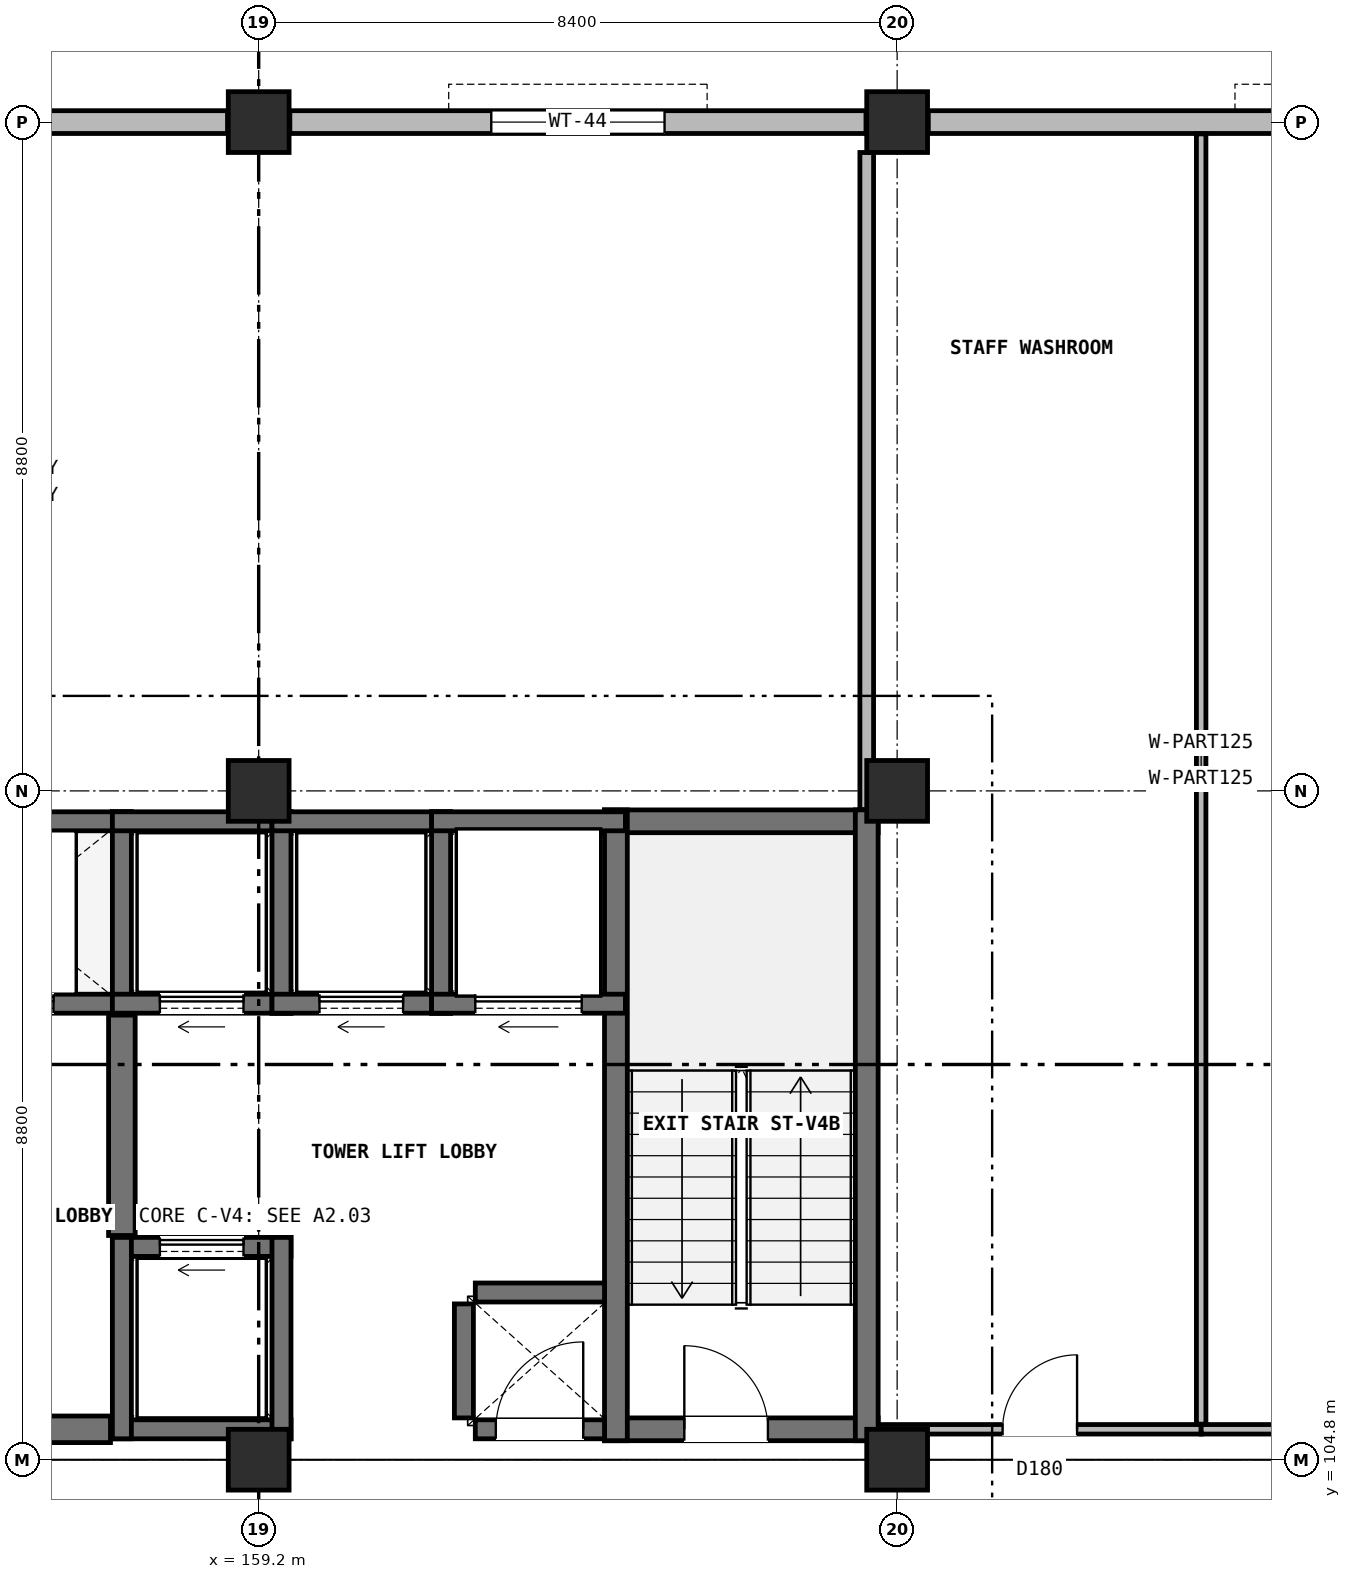
"""IFC4 building model, lengths in metres.
Left out: names, types, materials, properties, quantities, classifications, styles, units other than length and angle.
Written with IfcOpenShell. Run it as: python <this file> out.ifc"""

import sys

from ifc_helpers import new_model, si_unit, direction, frame, frame_2d, origin, origin_2d, place, context, subcontext, project, spatial, rectangle, extrude, element, fill, save


model = new_model("IFC4")
c1 = context("Model", 3, precision=1e-05, world=origin(), true_north=direction((0.0, 1.0)))
c2 = subcontext(c1, "Body", "Model", "MODEL_VIEW")
j1 = project(units=[si_unit("LENGTHUNIT", "METRE"), si_unit("PLANEANGLEUNIT", "RADIAN")], contexts=[c1])
p1 = place(None, origin())
s1 = spatial("IfcSite", under=j1, at=p1, CompositionType="ELEMENT")
p2 = place(p1, origin())
s2 = spatial("IfcBuilding", under=s1, at=p2, CompositionType="ELEMENT")
p3 = place(p2, frame((0.0, 0.0, 9.0)))
s3 = spatial("IfcBuildingStorey", under=s2, at=p3, CompositionType="ELEMENT", Elevation=9.0)
for number, where, z_axis, x_axis in (
    (1, (159.2, 104.8, 0.0), (0.0, 0.0, 1.0), (1.0, 0.0, 0.0)),
    (2, (159.2, 113.6, 0.0), (0.0, 0.0, 1.0), (1.0, 0.0, 0.0)),
    (3, (159.2, 122.4, 0.0), (0.0, 0.0, 1.0), (1.0, 0.0, 0.0)),
    (4, (167.6, 104.8, 0.0), (0.0, 0.0, 1.0), (1.0, 0.0, 0.0)),
    (5, (167.6, 113.6, 0.0), (0.0, 0.0, 1.0), (1.0, 0.0, 0.0)),
    (6, (167.6, 122.4, 0.0), (0.0, 0.0, 1.0), (1.0, 0.0, 0.0)),
):
    element("IfcColumn", number, at=place(p3, frame(where, z_axis=z_axis, x_axis=x_axis)), inside=s3, PredefinedType="COLUMN", context=c2, shape_type="SweptSolid", body=[
        extrude(rectangle(XDim=0.8, YDim=0.8, at=origin_2d()), origin(), (0.0, 0.0, 1.0), 4.2),
    ])
p4 = place(p3, frame((175.59, 122.4, 0.0), z_axis=(0.0, 0.0, 1.0), x_axis=(-1.0, 0.0, 0.0)))
e7 = element("IfcWall", 7, at=p4, inside=s3, PredefinedType="SOLIDWALL", context=c2, shape_type="SweptSolid", body=[
    extrude(rectangle(XDim=7.58, YDim=0.3, at=frame_2d((3.79, 0.0))), origin(), (0.0, 0.0, 1.0), 3.45),
])
p5 = place(p4, frame((1.005, 0.0, 0.9)))
e8 = element("IfcOpeningElement", 8, at=p5, cuts=e7, PredefinedType="OPENING", context=c2, shape_type="SweptSolid", body=[
    extrude(rectangle(XDim=1.98, YDim=2.32, at=frame_2d((0.99, 1.16))), frame((0.0, 0.16, 0.0), z_axis=(0.0, -1.0, 0.0), x_axis=(1.0, 0.0, 0.0)), (0.0, 0.0, 1.0), 0.32),
])
p6 = place(p3, frame((167.19, 122.4, 0.0), z_axis=(0.0, 0.0, 1.0), x_axis=(-1.0, 0.0, 0.0)))
e9 = element("IfcWall", 9, at=p6, inside=s3, PredefinedType="SOLIDWALL", context=c2, shape_type="SweptSolid", body=[
    extrude(rectangle(XDim=7.58, YDim=0.3, at=frame_2d((3.79, 0.0))), origin(), (0.0, 0.0, 1.0), 3.45),
])
p7 = place(p6, frame((2.65, 0.0, 0.9)))
e10 = element("IfcOpeningElement", 10, at=p7, cuts=e9, PredefinedType="OPENING", context=c2, shape_type="SweptSolid", body=[
    extrude(rectangle(XDim=2.28, YDim=2.36, at=frame_2d((1.14, 1.18))), frame((0.0, 0.16, 0.0), z_axis=(0.0, -1.0, 0.0), x_axis=(1.0, 0.0, 0.0)), (0.0, 0.0, 1.0), 0.32),
])
p8 = place(p3, frame((158.79, 122.4, 0.0), z_axis=(0.0, 0.0, 1.0), x_axis=(-1.0, 0.0, 0.0)))
e11 = element("IfcWall", 11, at=p8, inside=s3, PredefinedType="SOLIDWALL", context=c2, shape_type="SweptSolid", body=[
    extrude(rectangle(XDim=7.58, YDim=0.3, at=frame_2d((3.79, 0.0))), origin(), (0.0, 0.0, 1.0), 3.45),
])
p9 = place(p8, frame((3.21, 0.0, 0.9)))
e12 = element("IfcOpeningElement", 12, at=p9, cuts=e11, PredefinedType="OPENING", context=c2, shape_type="SweptSolid", body=[
    extrude(rectangle(XDim=1.16, YDim=1.74, at=frame_2d((0.58, 0.87))), frame((0.0, 0.16, 0.0), z_axis=(0.0, -1.0, 0.0), x_axis=(1.0, 0.0, 0.0)), (0.0, 0.0, 1.0), 0.32),
])
p10 = place(p3, frame((163.75, 105.2, 0.0), z_axis=(0.0, 0.0, 1.0), x_axis=(1.0, 0.0, 0.0)))
e13 = element("IfcWall", 13, at=p10, inside=s3, PredefinedType="SHEAR", context=c2, shape_type="SweptSolid", body=[
    extrude(rectangle(XDim=3.6, YDim=0.3, at=frame_2d((1.8, 0.0))), origin(), (0.0, 0.0, 1.0), 4.2),
])
p11 = place(p10, frame((1.05, 0.0, 0.0)))
e14 = element("IfcOpeningElement", 14, at=p11, cuts=e13, PredefinedType="OPENING", context=c2, shape_type="SweptSolid", body=[
    extrude(rectangle(XDim=1.1, YDim=2.2, at=frame_2d((0.55, 1.1))), frame((0.0, 0.16, 0.0), z_axis=(0.0, -1.0, 0.0), x_axis=(1.0, 0.0, 0.0)), (0.0, 0.0, 1.0), 0.32),
])
p12 = place(p3, frame((163.75, 113.2, 0.0), z_axis=(0.0, 0.0, 1.0), x_axis=(1.0, 0.0, 0.0)))
e15 = element("IfcWall", 15, at=p12, inside=s3, PredefinedType="SHEAR", context=c2, shape_type="SweptSolid", body=[
    extrude(rectangle(XDim=3.6, YDim=0.3, at=frame_2d((1.8, 0.0))), origin(), (0.0, 0.0, 1.0), 4.2),
])
for number, where, z_axis, x_axis in (
    (16, (163.9, 105.05, 0.0), (0.0, 0.0, 1.0), (0.0, 1.0, 0.0)),
    (17, (167.2, 105.05, 0.0), (0.0, 0.0, 1.0), (0.0, 1.0, 0.0)),
):
    element("IfcWall", number, at=place(p3, frame(where, z_axis=z_axis, x_axis=x_axis)), inside=s3, PredefinedType="SHEAR", context=c2, shape_type="SweptSolid", body=[
        extrude(rectangle(XDim=8.3, YDim=0.3, at=frame_2d((4.15, 0.0))), origin(), (0.0, 0.0, 1.0), 4.2),
    ])
p13 = place(p3, frame((154.275, 110.8, 0.0), z_axis=(0.0, 0.0, 1.0), x_axis=(1.0, 0.0, 0.0)))
e18 = element("IfcWall", 18, at=p13, inside=s3, PredefinedType="SOLIDWALL", context=c2, shape_type="SweptSolid", body=[
    extrude(rectangle(XDim=3.25, YDim=0.25, at=frame_2d((1.625, 0.0))), origin(), (0.0, 0.0, 1.0), 3.88),
])
p14 = place(p13, frame((1.025, 0.0, 0.0)))
e19 = element("IfcOpeningElement", 19, at=p14, cuts=e18, PredefinedType="OPENING", context=c2, shape_type="SweptSolid", body=[
    extrude(rectangle(XDim=1.2, YDim=2.2, at=frame_2d((0.6, 1.1))), frame((0.0, 0.135, 0.0), z_axis=(0.0, -1.0, 0.0), x_axis=(1.0, 0.0, 0.0)), (0.0, 0.0, 1.0), 0.27),
])
p15 = place(p3, frame((154.275, 113.2, 0.0), z_axis=(0.0, 0.0, 1.0), x_axis=(1.0, 0.0, 0.0)))
e20 = element("IfcWall", 20, at=p15, inside=s3, PredefinedType="SOLIDWALL", context=c2, shape_type="SweptSolid", body=[
    extrude(rectangle(XDim=3.25, YDim=0.25, at=frame_2d((1.625, 0.0))), origin(), (0.0, 0.0, 1.0), 3.88),
])
p16 = place(p3, frame((157.4, 110.675, 0.0), z_axis=(0.0, 0.0, 1.0), x_axis=(0.0, 1.0, 0.0)))
e21 = element("IfcWall", 21, at=p16, inside=s3, PredefinedType="SOLIDWALL", context=c2, shape_type="SweptSolid", body=[
    extrude(rectangle(XDim=2.65, YDim=0.25, at=frame_2d((1.325, 0.0))), origin(), (0.0, 0.0, 1.0), 3.88),
])
p17 = place(p3, frame((157.275, 110.8, 0.0), z_axis=(0.0, 0.0, 1.0), x_axis=(1.0, 0.0, 0.0)))
e22 = element("IfcWall", 22, at=p17, inside=s3, PredefinedType="SOLIDWALL", context=c2, shape_type="SweptSolid", body=[
    extrude(rectangle(XDim=2.35, YDim=0.25, at=frame_2d((1.175, 0.0))), origin(), (0.0, 0.0, 1.0), 3.88),
])
p18 = place(p17, frame((0.625, 0.0, 0.0)))
e23 = element("IfcOpeningElement", 23, at=p18, cuts=e22, PredefinedType="OPENING", context=c2, shape_type="SweptSolid", body=[
    extrude(rectangle(XDim=1.1, YDim=2.2, at=frame_2d((0.55, 1.1))), frame((0.0, 0.135, 0.0), z_axis=(0.0, -1.0, 0.0), x_axis=(1.0, 0.0, 0.0)), (0.0, 0.0, 1.0), 0.27),
])
p19 = place(p3, frame((157.275, 113.2, 0.0), z_axis=(0.0, 0.0, 1.0), x_axis=(1.0, 0.0, 0.0)))
e24 = element("IfcWall", 24, at=p19, inside=s3, PredefinedType="SOLIDWALL", context=c2, shape_type="SweptSolid", body=[
    extrude(rectangle(XDim=2.35, YDim=0.25, at=frame_2d((1.175, 0.0))), origin(), (0.0, 0.0, 1.0), 3.88),
])
p20 = place(p3, frame((159.5, 110.675, 0.0), z_axis=(0.0, 0.0, 1.0), x_axis=(0.0, 1.0, 0.0)))
e25 = element("IfcWall", 25, at=p20, inside=s3, PredefinedType="SOLIDWALL", context=c2, shape_type="SweptSolid", body=[
    extrude(rectangle(XDim=2.65, YDim=0.25, at=frame_2d((1.325, 0.0))), origin(), (0.0, 0.0, 1.0), 3.88),
])
p21 = place(p3, frame((159.375, 110.8, 0.0), z_axis=(0.0, 0.0, 1.0), x_axis=(1.0, 0.0, 0.0)))
e26 = element("IfcWall", 26, at=p21, inside=s3, PredefinedType="SOLIDWALL", context=c2, shape_type="SweptSolid", body=[
    extrude(rectangle(XDim=2.35, YDim=0.25, at=frame_2d((1.175, 0.0))), origin(), (0.0, 0.0, 1.0), 3.88),
])
p22 = place(p21, frame((0.625, 0.0, 0.0)))
e27 = element("IfcOpeningElement", 27, at=p22, cuts=e26, PredefinedType="OPENING", context=c2, shape_type="SweptSolid", body=[
    extrude(rectangle(XDim=1.1, YDim=2.2, at=frame_2d((0.55, 1.1))), frame((0.0, 0.135, 0.0), z_axis=(0.0, -1.0, 0.0), x_axis=(1.0, 0.0, 0.0)), (0.0, 0.0, 1.0), 0.27),
])
p23 = place(p3, frame((159.375, 113.2, 0.0), z_axis=(0.0, 0.0, 1.0), x_axis=(1.0, 0.0, 0.0)))
e28 = element("IfcWall", 28, at=p23, inside=s3, PredefinedType="SOLIDWALL", context=c2, shape_type="SweptSolid", body=[
    extrude(rectangle(XDim=2.35, YDim=0.25, at=frame_2d((1.175, 0.0))), origin(), (0.0, 0.0, 1.0), 3.88),
])
p24 = place(p3, frame((161.6, 110.675, 0.0), z_axis=(0.0, 0.0, 1.0), x_axis=(0.0, 1.0, 0.0)))
e29 = element("IfcWall", 29, at=p24, inside=s3, PredefinedType="SOLIDWALL", context=c2, shape_type="SweptSolid", body=[
    extrude(rectangle(XDim=2.65, YDim=0.25, at=frame_2d((1.325, 0.0))), origin(), (0.0, 0.0, 1.0), 3.88),
])
p25 = place(p3, frame((157.275, 105.2, 0.0), z_axis=(0.0, 0.0, 1.0), x_axis=(1.0, 0.0, 0.0)))
e30 = element("IfcWall", 30, at=p25, inside=s3, PredefinedType="SOLIDWALL", context=c2, shape_type="SweptSolid", body=[
    extrude(rectangle(XDim=2.35, YDim=0.25, at=frame_2d((1.175, 0.0))), origin(), (0.0, 0.0, 1.0), 3.88),
])
p26 = place(p3, frame((157.275, 107.6, 0.0), z_axis=(0.0, 0.0, 1.0), x_axis=(1.0, 0.0, 0.0)))
e31 = element("IfcWall", 31, at=p26, inside=s3, PredefinedType="SOLIDWALL", context=c2, shape_type="SweptSolid", body=[
    extrude(rectangle(XDim=2.35, YDim=0.25, at=frame_2d((1.175, 0.0))), origin(), (0.0, 0.0, 1.0), 3.88),
])
p27 = place(p26, frame((0.625, 0.0, 0.0)))
e32 = element("IfcOpeningElement", 32, at=p27, cuts=e31, PredefinedType="OPENING", context=c2, shape_type="SweptSolid", body=[
    extrude(rectangle(XDim=1.1, YDim=2.2, at=frame_2d((0.55, 1.1))), frame((0.0, 0.135, 0.0), z_axis=(0.0, -1.0, 0.0), x_axis=(1.0, 0.0, 0.0)), (0.0, 0.0, 1.0), 0.27),
])
for number, where, z_axis, x_axis in (
    (33, (157.4, 105.075, 0.0), (0.0, 0.0, 1.0), (0.0, 1.0, 0.0)),
    (34, (159.5, 105.075, 0.0), (0.0, 0.0, 1.0), (0.0, 1.0, 0.0)),
):
    element("IfcWall", number, at=place(p3, frame(where, z_axis=z_axis, x_axis=x_axis)), inside=s3, PredefinedType="SOLIDWALL", context=c2, shape_type="SweptSolid", body=[
        extrude(rectangle(XDim=2.65, YDim=0.25, at=frame_2d((1.325, 0.0))), origin(), (0.0, 0.0, 1.0), 3.88),
    ])
p28 = place(p3, frame((161.475, 110.8, 0.0), z_axis=(0.0, 0.0, 1.0), x_axis=(1.0, 0.0, 0.0)))
e35 = element("IfcWall", 35, at=p28, inside=s3, PredefinedType="SOLIDWALL", context=c2, shape_type="SweptSolid", body=[
    extrude(rectangle(XDim=2.55, YDim=0.25, at=frame_2d((1.275, 0.0))), origin(), (0.0, 0.0, 1.0), 3.88),
])
p29 = place(p28, frame((0.575, 0.0, 0.0)))
e36 = element("IfcOpeningElement", 36, at=p29, cuts=e35, PredefinedType="OPENING", context=c2, shape_type="SweptSolid", body=[
    extrude(rectangle(XDim=1.4, YDim=2.3, at=frame_2d((0.7, 1.15))), frame((0.0, 0.135, 0.0), z_axis=(0.0, -1.0, 0.0), x_axis=(1.0, 0.0, 0.0)), (0.0, 0.0, 1.0), 0.27),
])
p30 = place(p3, frame((161.475, 113.2, 0.0), z_axis=(0.0, 0.0, 1.0), x_axis=(1.0, 0.0, 0.0)))
e37 = element("IfcWall", 37, at=p30, inside=s3, PredefinedType="SOLIDWALL", context=c2, shape_type="SweptSolid", body=[
    extrude(rectangle(XDim=2.55, YDim=0.25, at=frame_2d((1.275, 0.0))), origin(), (0.0, 0.0, 1.0), 3.88),
])
p31 = place(p3, frame((157.4, 107.75, 0.0), z_axis=(0.0, 0.0, 1.0), x_axis=(0.0, 1.0, 0.0)))
e38 = element("IfcWall", 38, at=p31, inside=s3, PredefinedType="SHEAR", context=c2, shape_type="SweptSolid", body=[
    extrude(rectangle(XDim=2.9, YDim=0.35, at=frame_2d((1.45, 0.0))), origin(), (0.0, 0.0, 1.0), 3.88),
])
p32 = place(p3, frame((154.55, 105.2, 0.0), z_axis=(0.0, 0.0, 1.0), x_axis=(1.0, 0.0, 0.0)))
e39 = element("IfcWall", 39, at=p32, inside=s3, PredefinedType="SHEAR", context=c2, shape_type="SweptSolid", body=[
    extrude(rectangle(XDim=2.7, YDim=0.35, at=frame_2d((1.35, 0.0))), origin(), (0.0, 0.0, 1.0), 3.88),
])
p33 = place(p32, frame((0.8, 0.0, 0.0)))
e40 = element("IfcOpeningElement", 40, at=p33, cuts=e39, PredefinedType="OPENING", context=c2, shape_type="SweptSolid", body=[
    extrude(rectangle(XDim=1.1, YDim=2.2, at=frame_2d((0.55, 1.1))), frame((0.0, 0.185, 0.0), z_axis=(0.0, -1.0, 0.0), x_axis=(1.0, 0.0, 0.0)), (0.0, 0.0, 1.0), 0.37),
])
p34 = place(p3, frame((161.9, 105.35, 0.0), z_axis=(0.0, 0.0, 1.0), x_axis=(0.0, 1.0, 0.0)))
e41 = element("IfcWall", 41, at=p34, inside=s3, PredefinedType="SOLIDWALL", context=c2, shape_type="SweptSolid", body=[
    extrude(rectangle(XDim=1.5, YDim=0.25, at=frame_2d((0.75, 0.0))), origin(), (0.0, 0.0, 1.0), 3.88),
])
p35 = place(p3, frame((162.05, 107.0, 0.0), z_axis=(0.0, 0.0, 1.0), x_axis=(1.0, 0.0, 0.0)))
e42 = element("IfcWall", 42, at=p35, inside=s3, PredefinedType="SOLIDWALL", context=c2, shape_type="SweptSolid", body=[
    extrude(rectangle(XDim=1.7, YDim=0.25, at=frame_2d((0.85, 0.0))), origin(), (0.0, 0.0, 1.0), 3.88),
])
p36 = place(p3, frame((162.05, 105.2, 0.0), z_axis=(0.0, 0.0, 1.0), x_axis=(1.0, 0.0, 0.0)))
e43 = element("IfcWall", 43, at=p36, inside=s3, PredefinedType="SOLIDWALL", context=c2, shape_type="SweptSolid", body=[
    extrude(rectangle(XDim=1.7, YDim=0.25, at=frame_2d((0.85, 0.0))), origin(), (0.0, 0.0, 1.0), 3.88),
])
p37 = place(p36, frame((0.27, 0.0, 0.0)))
e44 = element("IfcOpeningElement", 44, at=p37, cuts=e43, PredefinedType="OPENING", context=c2, shape_type="SweptSolid", body=[
    extrude(rectangle(XDim=1.15, YDim=2.2, at=frame_2d((0.575, 1.1))), frame((0.0, 0.135, 0.0), z_axis=(0.0, -1.0, 0.0), x_axis=(1.0, 0.0, 0.0)), (0.0, 0.0, 1.0), 0.27),
])
p38 = place(p3, frame((167.355, 105.2, 0.0), z_axis=(0.0, 0.0, 1.0), x_axis=(1.0, 0.0, 0.0)))
e45 = element("IfcWall", 45, at=p38, inside=s3, PredefinedType="PARTITIONING", context=c2, shape_type="SweptSolid", body=[
    extrude(rectangle(XDim=4.245, YDim=0.125, at=frame_2d((2.123, 0.0))), origin(), (0.0, 0.0, 1.0), 3.245),
])
p39 = place(p38, frame((1.633, 0.0, 0.0)))
e46 = element("IfcOpeningElement", 46, at=p39, cuts=e45, PredefinedType="OPENING", context=c2, shape_type="SweptSolid", body=[
    extrude(rectangle(XDim=0.98, YDim=2.1, at=frame_2d((0.49, 1.05))), frame((0.0, 0.073, 0.0), z_axis=(0.0, -1.0, 0.0), x_axis=(1.0, 0.0, 0.0)), (0.0, 0.0, 1.0), 0.145),
])
p40 = place(p3, frame((171.6, 105.2, 0.0), z_axis=(0.0, 0.0, 1.0), x_axis=(1.0, 0.0, 0.0)))
e47 = element("IfcWall", 47, at=p40, inside=s3, PredefinedType="PARTITIONING", context=c2, shape_type="SweptSolid", body=[
    extrude(rectangle(XDim=4.0, YDim=0.125, at=frame_2d((2.0, 0.0))), origin(), (0.0, 0.0, 1.0), 3.245),
])
p41 = place(p40, frame((1.51, 0.0, 0.0)))
e48 = element("IfcOpeningElement", 48, at=p41, cuts=e47, PredefinedType="OPENING", context=c2, shape_type="SweptSolid", body=[
    extrude(rectangle(XDim=0.98, YDim=2.1, at=frame_2d((0.49, 1.05))), frame((0.0, 0.073, 0.0), z_axis=(0.0, -1.0, 0.0), x_axis=(1.0, 0.0, 0.0)), (0.0, 0.0, 1.0), 0.145),
])
p42 = place(p3, frame((167.2, 113.355, 0.0), z_axis=(0.0, 0.0, 1.0), x_axis=(0.0, 1.0, 0.0)))
e49 = element("IfcWall", 49, at=p42, inside=s3, PredefinedType="PARTITIONING", context=c2, shape_type="SweptSolid", body=[
    extrude(rectangle(XDim=8.645, YDim=0.18, at=frame_2d((4.323, 0.0))), origin(), (0.0, 0.0, 1.0), 3.245),
])
p43 = place(p3, frame((171.6, 105.268, 0.0), z_axis=(0.0, 0.0, 1.0), x_axis=(0.0, 1.0, 0.0)))
e50 = element("IfcWall", 50, at=p43, inside=s3, PredefinedType="PARTITIONING", context=c2, shape_type="SweptSolid", body=[
    extrude(rectangle(XDim=16.978, YDim=0.125, at=frame_2d((8.489, 0.0))), origin(), (0.0, 0.0, 1.0), 3.865),
])
p44 = place(p7, origin())
e51 = element("IfcWindow", 51, at=p44, inside=s3, PartitioningType="SINGLE_PANEL", PredefinedType="WINDOW", context=c2, shape_type="SweptSolid", body=[
    extrude(rectangle(XDim=2.28, YDim=2.36, at=frame_2d((1.14, 1.18))), frame((0.0, 0.03, 0.0), z_axis=(0.0, -1.0, 0.0), x_axis=(1.0, 0.0, 0.0)), (0.0, 0.0, 1.0), 0.06),
])
fill(e10, e51)
p45 = place(p11, origin())
e52 = element("IfcDoor", 52, at=p45, inside=s3, OperationType="SINGLE_SWING_LEFT", PredefinedType="DOOR", context=c2, shape_type="SweptSolid", body=[
    extrude(rectangle(XDim=1.1, YDim=2.2, at=frame_2d((0.55, 1.1))), frame((0.0, 0.025, 0.0), z_axis=(0.0, -1.0, 0.0), x_axis=(1.0, 0.0, 0.0)), (0.0, 0.0, 1.0), 0.05),
])
fill(e14, e52)
p46 = place(p14, origin())
e53 = element("IfcDoor", 53, at=p46, inside=s3, OperationType="SLIDING_TO_LEFT", PredefinedType="DOOR", context=c2, shape_type="SweptSolid", body=[
    extrude(rectangle(XDim=1.2, YDim=2.2, at=frame_2d((0.6, 1.1))), frame((0.0, 0.025, 0.0), z_axis=(0.0, -1.0, 0.0), x_axis=(1.0, 0.0, 0.0)), (0.0, 0.0, 1.0), 0.05),
])
fill(e19, e53)
p47 = place(p18, origin())
e54 = element("IfcDoor", 54, at=p47, inside=s3, OperationType="SLIDING_TO_LEFT", PredefinedType="DOOR", context=c2, shape_type="SweptSolid", body=[
    extrude(rectangle(XDim=1.1, YDim=2.2, at=frame_2d((0.55, 1.1))), frame((0.0, 0.025, 0.0), z_axis=(0.0, -1.0, 0.0), x_axis=(1.0, 0.0, 0.0)), (0.0, 0.0, 1.0), 0.05),
])
fill(e23, e54)
p48 = place(p22, origin())
e55 = element("IfcDoor", 55, at=p48, inside=s3, OperationType="SLIDING_TO_LEFT", PredefinedType="DOOR", context=c2, shape_type="SweptSolid", body=[
    extrude(rectangle(XDim=1.1, YDim=2.2, at=frame_2d((0.55, 1.1))), frame((0.0, 0.025, 0.0), z_axis=(0.0, -1.0, 0.0), x_axis=(1.0, 0.0, 0.0)), (0.0, 0.0, 1.0), 0.05),
])
fill(e27, e55)
p49 = place(p27, origin())
e56 = element("IfcDoor", 56, at=p49, inside=s3, OperationType="SLIDING_TO_LEFT", PredefinedType="DOOR", context=c2, shape_type="SweptSolid", body=[
    extrude(rectangle(XDim=1.1, YDim=2.2, at=frame_2d((0.55, 1.1))), frame((0.0, 0.025, 0.0), z_axis=(0.0, -1.0, 0.0), x_axis=(1.0, 0.0, 0.0)), (0.0, 0.0, 1.0), 0.05),
])
fill(e32, e56)
p50 = place(p29, origin())
e57 = element("IfcDoor", 57, at=p50, inside=s3, OperationType="SLIDING_TO_LEFT", PredefinedType="DOOR", context=c2, shape_type="SweptSolid", body=[
    extrude(rectangle(XDim=1.4, YDim=2.3, at=frame_2d((0.7, 1.15))), frame((0.0, 0.025, 0.0), z_axis=(0.0, -1.0, 0.0), x_axis=(1.0, 0.0, 0.0)), (0.0, 0.0, 1.0), 0.05),
])
fill(e36, e57)
p51 = place(p37, origin())
e58 = element("IfcDoor", 58, at=p51, inside=s3, OperationType="SINGLE_SWING_RIGHT", PredefinedType="DOOR", context=c2, shape_type="SweptSolid", body=[
    extrude(rectangle(XDim=1.15, YDim=2.2, at=frame_2d((0.575, 1.1))), frame((0.0, 0.025, 0.0), z_axis=(0.0, -1.0, 0.0), x_axis=(1.0, 0.0, 0.0)), (0.0, 0.0, 1.0), 0.05),
])
fill(e44, e58)
p52 = place(p39, origin())
e59 = element("IfcDoor", 59, at=p52, inside=s3, OperationType="SINGLE_SWING_RIGHT", PredefinedType="DOOR", context=c2, shape_type="SweptSolid", body=[
    extrude(rectangle(XDim=0.98, YDim=2.1, at=frame_2d((0.49, 1.05))), frame((0.0, 0.025, 0.0), z_axis=(0.0, -1.0, 0.0), x_axis=(1.0, 0.0, 0.0)), (0.0, 0.0, 1.0), 0.05),
])
fill(e46, e59)
save(model, sys.argv[1])
